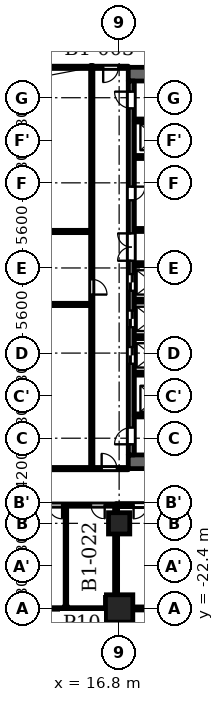
"""IFC4 building model, lengths in metres.
Left out: names, types, materials, properties, quantities, classifications, styles, units other than length and angle.
Written with IfcOpenShell. Run it as: python <this file> out.ifc"""

import sys

from ifc_helpers import new_model, si_unit, direction, frame, frame_2d, origin, origin_2d, place, context, subcontext, project, spatial, rectangle, extrude, element, fill, save


model = new_model("IFC4")
c1 = context("Model", 3, precision=1e-05, world=origin(), true_north=direction((0.0, 1.0)))
c2 = subcontext(c1, "Body", "Model", "MODEL_VIEW")
j1 = project(units=[si_unit("LENGTHUNIT", "METRE"), si_unit("PLANEANGLEUNIT", "RADIAN")], contexts=[c1])
p1 = place(None, origin())
s1 = spatial("IfcSite", under=j1, at=p1, CompositionType="ELEMENT")
p2 = place(p1, origin())
s2 = spatial("IfcBuilding", under=s1, at=p2, CompositionType="ELEMENT")
p3 = place(p2, frame((0.0, 0.0, -4.5)))
s3 = spatial("IfcBuildingStorey", under=s2, at=p3, CompositionType="ELEMENT", Elevation=-4.5)
p4 = place(p3, frame((16.8, -22.4, 0.0), z_axis=(0.0, 0.0, 1.0), x_axis=(1.0, 0.0, 0.0)))
e1 = element("IfcColumn", 1, at=p4, inside=s3, PredefinedType="COLUMN", context=c2, shape_type="SweptSolid", body=[
    extrude(rectangle(XDim=1.8, YDim=1.8, at=origin_2d()), origin(), (0.0, 0.0, 1.0), 4.5),
])
p5 = place(p3, frame((16.8, -16.8, 0.0), z_axis=(0.0, 0.0, 1.0), x_axis=(1.0, 0.0, 0.0)))
e2 = element("IfcColumn", 2, at=p5, inside=s3, PredefinedType="COLUMN", context=c2, shape_type="SweptSolid", body=[
    extrude(rectangle(XDim=1.4, YDim=1.4, at=origin_2d()), origin(), (0.0, 0.0, 1.0), 4.5),
])
for number, where, z_axis, x_axis in (
    (3, (17.4, 12.75, 0.0), (0.0, 0.0, 1.0), (1.0, 0.0, 0.0)),
    (4, (17.4, -12.75, 0.0), (0.0, 0.0, 1.0), (1.0, 0.0, 0.0)),
):
    element("IfcWall", number, at=place(p3, frame(where, z_axis=z_axis, x_axis=x_axis)), inside=s3, PredefinedType="SHEAR", context=c2, shape_type="SweptSolid", body=[
        extrude(rectangle(XDim=10.4, YDim=0.9, at=frame_2d((5.2, 0.0))), origin(), (0.0, 0.0, 1.0), 4.05),
    ])
p6 = place(p3, frame((17.6, -12.3, 0.0), z_axis=(0.0, 0.0, 1.0), x_axis=(0.0, 1.0, 0.0)))
e5 = element("IfcWall", 5, at=p6, inside=s3, PredefinedType="SHEAR", context=c2, shape_type="SweptSolid", body=[
    extrude(rectangle(XDim=24.6, YDim=0.4, at=frame_2d((12.3, 0.0))), origin(), (0.0, 0.0, 1.0), 4.05),
])
p7 = place(p6, frame((6.0, 0.0, 0.0)))
e6 = element("IfcOpeningElement", 6, at=p7, cuts=e5, PredefinedType="OPENING", context=c2, shape_type="SweptSolid", body=[
    extrude(rectangle(XDim=1.1, YDim=2.1, at=frame_2d((0.55, 1.05))), frame((0.0, 0.21, 0.0), z_axis=(0.0, -1.0, 0.0), x_axis=(1.0, 0.0, 0.0)), (0.0, 0.0, 1.0), 0.42),
])
p8 = place(p6, frame((8.4, 0.0, 0.0)))
e7 = element("IfcOpeningElement", 7, at=p8, cuts=e5, PredefinedType="OPENING", context=c2, shape_type="SweptSolid", body=[
    extrude(rectangle(XDim=1.1, YDim=2.1, at=frame_2d((0.55, 1.05))), frame((0.0, 0.21, 0.0), z_axis=(0.0, -1.0, 0.0), x_axis=(1.0, 0.0, 0.0)), (0.0, 0.0, 1.0), 0.42),
])
p9 = place(p6, frame((10.8, 0.0, 0.0)))
e8 = element("IfcOpeningElement", 8, at=p9, cuts=e5, PredefinedType="OPENING", context=c2, shape_type="SweptSolid", body=[
    extrude(rectangle(XDim=1.1, YDim=2.1, at=frame_2d((0.55, 1.05))), frame((0.0, 0.21, 0.0), z_axis=(0.0, -1.0, 0.0), x_axis=(1.0, 0.0, 0.0)), (0.0, 0.0, 1.0), 0.42),
])
p10 = place(p6, frame((16.75, 0.0, 0.0)))
e9 = element("IfcOpeningElement", 9, at=p10, cuts=e5, PredefinedType="OPENING", context=c2, shape_type="SweptSolid", body=[
    extrude(rectangle(XDim=0.9, YDim=2.1, at=frame_2d((0.45, 1.05))), frame((0.0, 0.21, 0.0), z_axis=(0.0, -1.0, 0.0), x_axis=(1.0, 0.0, 0.0)), (0.0, 0.0, 1.0), 0.42),
])
p11 = place(p6, frame((22.8, 0.0, 0.0)))
e10 = element("IfcOpeningElement", 10, at=p11, cuts=e5, PredefinedType="OPENING", context=c2, shape_type="SweptSolid", body=[
    extrude(rectangle(XDim=1.1, YDim=2.1, at=frame_2d((0.55, 1.05))), frame((0.0, 0.21, 0.0), z_axis=(0.0, -1.0, 0.0), x_axis=(1.0, 0.0, 0.0)), (0.0, 0.0, 1.0), 0.42),
])
p12 = place(p6, frame((0.7, 0.0, 0.0)))
e11 = element("IfcOpeningElement", 11, at=p12, cuts=e5, PredefinedType="OPENING", context=c2, shape_type="SweptSolid", body=[
    extrude(rectangle(XDim=1.1, YDim=2.1, at=frame_2d((0.55, 1.05))), frame((0.0, 0.21, 0.0), z_axis=(0.0, -1.0, 0.0), x_axis=(1.0, 0.0, 0.0)), (0.0, 0.0, 1.0), 0.42),
])
p13 = place(p6, frame((12.775, 0.0, 0.0)))
e12 = element("IfcOpeningElement", 12, at=p13, cuts=e5, PredefinedType="OPENING", context=c2, shape_type="SweptSolid", body=[
    extrude(rectangle(XDim=1.8, YDim=2.1, at=frame_2d((0.9, 1.05))), frame((0.0, 0.21, 0.0), z_axis=(0.0, -1.0, 0.0), x_axis=(1.0, 0.0, 0.0)), (0.0, 0.0, 1.0), 0.42),
])
p14 = place(p3, frame((17.8, -9.7, 0.0), z_axis=(0.0, 0.0, 1.0), x_axis=(1.0, 0.0, 0.0)))
e13 = element("IfcWall", 13, at=p14, inside=s3, PredefinedType="SHEAR", context=c2, shape_type="SweptSolid", body=[
    extrude(rectangle(XDim=8.3, YDim=0.2, at=frame_2d((4.15, 0.0))), origin(), (0.0, 0.0, 1.0), 4.05),
])
p15 = place(p14, frame((0.85, 0.0, 0.0)))
e14 = element("IfcOpeningElement", 14, at=p15, cuts=e13, PredefinedType="OPENING", context=c2, shape_type="SweptSolid", body=[
    extrude(rectangle(XDim=1.1, YDim=2.1, at=frame_2d((0.55, 1.05))), frame((0.0, 0.11, 0.0), z_axis=(0.0, -1.0, 0.0), x_axis=(1.0, 0.0, 0.0)), (0.0, 0.0, 1.0), 0.22),
])
p16 = place(p14, frame((3.75, 0.0, 0.0)))
e15 = element("IfcOpeningElement", 15, at=p16, cuts=e13, PredefinedType="OPENING", context=c2, shape_type="SweptSolid", body=[
    extrude(rectangle(XDim=1.1, YDim=2.1, at=frame_2d((0.55, 1.05))), frame((0.0, 0.11, 0.0), z_axis=(0.0, -1.0, 0.0), x_axis=(1.0, 0.0, 0.0)), (0.0, 0.0, 1.0), 0.22),
])
for number, where, z_axis, x_axis in (
    (16, (17.8, -6.95, 0.0), (0.0, 0.0, 1.0), (1.0, 0.0, 0.0)),
    (17, (17.8, -4.55, 0.0), (0.0, 0.0, 1.0), (1.0, 0.0, 0.0)),
    (18, (17.8, -2.15, 0.0), (0.0, 0.0, 1.0), (1.0, 0.0, 0.0)),
):
    element("IfcWall", number, at=place(p3, frame(where, z_axis=z_axis, x_axis=x_axis)), inside=s3, PredefinedType="PARTITIONING", context=c2, shape_type="SweptSolid", body=[
        extrude(rectangle(XDim=2.8, YDim=0.2, at=frame_2d((1.4, 0.0))), origin(), (0.0, 0.0, 1.0), 4.05),
    ])
for number, where, z_axis, x_axis in (
    (19, (17.8, 0.25, 0.0), (0.0, 0.0, 1.0), (1.0, 0.0, 0.0)),
    (20, (17.8, 2.5, 0.0), (0.0, 0.0, 1.0), (1.0, 0.0, 0.0)),
):
    element("IfcWall", number, at=place(p3, frame(where, z_axis=z_axis, x_axis=x_axis)), inside=s3, PredefinedType="PARTITIONING", context=c2, shape_type="SweptSolid", body=[
        extrude(rectangle(XDim=3.0, YDim=0.2, at=frame_2d((1.5, 0.0))), origin(), (0.0, 0.0, 1.0), 4.05),
    ])
p17 = place(p3, frame((17.8, 7.3, 0.0), z_axis=(0.0, 0.0, 1.0), x_axis=(1.0, 0.0, 0.0)))
e21 = element("IfcWall", 21, at=p17, inside=s3, PredefinedType="PARTITIONING", context=c2, shape_type="SweptSolid", body=[
    extrude(rectangle(XDim=2.8, YDim=0.2, at=frame_2d((1.4, 0.0))), origin(), (0.0, 0.0, 1.0), 4.05),
])
p18 = place(p3, frame((17.8, 9.7, 0.0), z_axis=(0.0, 0.0, 1.0), x_axis=(1.0, 0.0, 0.0)))
e22 = element("IfcWall", 22, at=p18, inside=s3, PredefinedType="SHEAR", context=c2, shape_type="SweptSolid", body=[
    extrude(rectangle(XDim=8.3, YDim=0.2, at=frame_2d((4.15, 0.0))), origin(), (0.0, 0.0, 1.0), 4.05),
])
p19 = place(p18, frame((0.85, 0.0, 0.0)))
e23 = element("IfcOpeningElement", 23, at=p19, cuts=e22, PredefinedType="OPENING", context=c2, shape_type="SweptSolid", body=[
    extrude(rectangle(XDim=1.1, YDim=2.1, at=frame_2d((0.55, 1.05))), frame((0.0, 0.11, 0.0), z_axis=(0.0, -1.0, 0.0), x_axis=(1.0, 0.0, 0.0)), (0.0, 0.0, 1.0), 0.22),
])
p20 = place(p18, frame((3.75, 0.0, 0.0)))
e24 = element("IfcOpeningElement", 24, at=p20, cuts=e22, PredefinedType="OPENING", context=c2, shape_type="SweptSolid", body=[
    extrude(rectangle(XDim=1.1, YDim=2.1, at=frame_2d((0.55, 1.05))), frame((0.0, 0.11, 0.0), z_axis=(0.0, -1.0, 0.0), x_axis=(1.0, 0.0, 0.0)), (0.0, 0.0, 1.0), 0.22),
])
p21 = place(p3, frame((10.0, -22.4, 0.0), z_axis=(0.0, 0.0, 1.0), x_axis=(1.0, 0.0, 0.0)))
e25 = element("IfcWall", 25, at=p21, inside=s3, PredefinedType="PARTITIONING", context=c2, shape_type="SweptSolid", body=[
    extrude(rectangle(XDim=6.6, YDim=0.1, at=frame_2d((3.3, 0.0))), origin(), (0.0, 0.0, 1.0), 3.15),
])
p22 = place(p3, frame((16.6, -22.4, 0.0), z_axis=(0.0, 0.0, 1.0), x_axis=(1.0, 0.0, 0.0)))
e26 = element("IfcWall", 26, at=p22, inside=s3, PredefinedType="PARTITIONING", context=c2, shape_type="SweptSolid", body=[
    extrude(rectangle(XDim=2.19, YDim=0.2, at=frame_2d((1.095, 0.0))), origin(), (0.0, 0.0, 1.0), 3.15),
])
p23 = place(p3, frame((-27.67, -15.6, 0.0), z_axis=(0.0, 0.0, 1.0), x_axis=(1.0, 0.0, 0.0)))
e27 = element("IfcWall", 27, at=p23, inside=s3, PredefinedType="PARTITIONING", context=c2, shape_type="SweptSolid", body=[
    extrude(rectangle(XDim=44.27, YDim=0.15, at=frame_2d((22.135, 0.0))), origin(), (0.0, 0.0, 1.0), 4.05),
])
p24 = place(p23, frame((29.42, 0.0, 0.0)))
e28 = element("IfcOpeningElement", 28, at=p24, cuts=e27, PredefinedType="OPENING", context=c2, shape_type="SweptSolid", body=[
    extrude(rectangle(XDim=1.2, YDim=2.1, at=frame_2d((0.6, 1.05))), frame((0.0, 0.085, 0.0), z_axis=(0.0, -1.0, 0.0), x_axis=(1.0, 0.0, 0.0)), (0.0, 0.0, 1.0), 0.17),
])
p25 = place(p23, frame((1.141, 0.0, 0.0)))
e29 = element("IfcOpeningElement", 29, at=p25, cuts=e27, PredefinedType="OPENING", context=c2, shape_type="SweptSolid", body=[
    extrude(rectangle(XDim=0.9, YDim=2.1, at=frame_2d((0.45, 1.05))), frame((0.0, 0.085, 0.0), z_axis=(0.0, -1.0, 0.0), x_axis=(1.0, 0.0, 0.0)), (0.0, 0.0, 1.0), 0.17),
])
p26 = place(p23, frame((18.07, 0.0, 0.0)))
e30 = element("IfcOpeningElement", 30, at=p26, cuts=e27, PredefinedType="OPENING", context=c2, shape_type="SweptSolid", body=[
    extrude(rectangle(XDim=0.9, YDim=2.1, at=frame_2d((0.45, 1.05))), frame((0.0, 0.085, 0.0), z_axis=(0.0, -1.0, 0.0), x_axis=(1.0, 0.0, 0.0)), (0.0, 0.0, 1.0), 0.17),
])
p27 = place(p23, frame((20.32, 0.0, 0.0)))
e31 = element("IfcOpeningElement", 31, at=p27, cuts=e27, PredefinedType="OPENING", context=c2, shape_type="SweptSolid", body=[
    extrude(rectangle(XDim=0.9, YDim=2.1, at=frame_2d((0.45, 1.05))), frame((0.0, 0.085, 0.0), z_axis=(0.0, -1.0, 0.0), x_axis=(1.0, 0.0, 0.0)), (0.0, 0.0, 1.0), 0.17),
])
p28 = place(p23, frame((36.17, 0.0, 0.0)))
e32 = element("IfcOpeningElement", 32, at=p28, cuts=e27, PredefinedType="OPENING", context=c2, shape_type="SweptSolid", body=[
    extrude(rectangle(XDim=0.9, YDim=2.1, at=frame_2d((0.45, 1.05))), frame((0.0, 0.085, 0.0), z_axis=(0.0, -1.0, 0.0), x_axis=(1.0, 0.0, 0.0)), (0.0, 0.0, 1.0), 0.17),
])
p29 = place(p23, frame((39.82, 0.0, 0.0)))
e33 = element("IfcOpeningElement", 33, at=p29, cuts=e27, PredefinedType="OPENING", context=c2, shape_type="SweptSolid", body=[
    extrude(rectangle(XDim=0.9, YDim=2.1, at=frame_2d((0.45, 1.05))), frame((0.0, 0.085, 0.0), z_axis=(0.0, -1.0, 0.0), x_axis=(1.0, 0.0, 0.0)), (0.0, 0.0, 1.0), 0.17),
])
p30 = place(p23, frame((42.62, 0.0, 0.0)))
e34 = element("IfcOpeningElement", 34, at=p30, cuts=e27, PredefinedType="OPENING", context=c2, shape_type="SweptSolid", body=[
    extrude(rectangle(XDim=0.9, YDim=2.1, at=frame_2d((0.45, 1.05))), frame((0.0, 0.085, 0.0), z_axis=(0.0, -1.0, 0.0), x_axis=(1.0, 0.0, 0.0)), (0.0, 0.0, 1.0), 0.17),
])
p31 = place(p3, frame((16.6, -15.6, 0.0), z_axis=(0.0, 0.0, 1.0), x_axis=(1.0, 0.0, 0.0)))
e35 = element("IfcWall", 35, at=p31, inside=s3, PredefinedType="PARTITIONING", context=c2, shape_type="SweptSolid", body=[
    extrude(rectangle(XDim=11.07, YDim=0.2, at=frame_2d((5.535, 0.0))), origin(), (0.0, 0.0, 1.0), 4.05),
])
p32 = place(p31, frame((1.15, 0.0, 0.0)))
e36 = element("IfcOpeningElement", 36, at=p32, cuts=e35, PredefinedType="OPENING", context=c2, shape_type="SweptSolid", body=[
    extrude(rectangle(XDim=0.9, YDim=2.1, at=frame_2d((0.45, 1.05))), frame((0.0, 0.11, 0.0), z_axis=(0.0, -1.0, 0.0), x_axis=(1.0, 0.0, 0.0)), (0.0, 0.0, 1.0), 0.22),
])
p33 = place(p31, frame((8.795, 0.0, 0.0)))
e37 = element("IfcOpeningElement", 37, at=p33, cuts=e35, PredefinedType="OPENING", context=c2, shape_type="SweptSolid", body=[
    extrude(rectangle(XDim=0.9, YDim=2.1, at=frame_2d((0.45, 1.05))), frame((0.0, 0.11, 0.0), z_axis=(0.0, -1.0, 0.0), x_axis=(1.0, 0.0, 0.0)), (0.0, 0.0, 1.0), 0.22),
])
p34 = place(p3, frame((-17.4, -13.2, 0.0), z_axis=(0.0, 0.0, 1.0), x_axis=(1.0, 0.0, 0.0)))
e38 = element("IfcWall", 38, at=p34, inside=s3, PredefinedType="PARTITIONING", context=c2, shape_type="SweptSolid", body=[
    extrude(rectangle(XDim=34.8, YDim=0.15, at=frame_2d((17.4, 0.0))), origin(), (0.0, 0.0, 1.0), 4.05),
])
p35 = place(p34, frame((16.05, 0.0, 0.0)))
e39 = element("IfcOpeningElement", 39, at=p35, cuts=e38, PredefinedType="OPENING", context=c2, shape_type="SweptSolid", body=[
    extrude(rectangle(XDim=1.2, YDim=2.1, at=frame_2d((0.6, 1.05))), frame((0.0, 0.085, 0.0), z_axis=(0.0, -1.0, 0.0), x_axis=(1.0, 0.0, 0.0)), (0.0, 0.0, 1.0), 0.17),
])
p36 = place(p34, frame((0.65, 0.0, 0.0)))
e40 = element("IfcOpeningElement", 40, at=p36, cuts=e38, PredefinedType="OPENING", context=c2, shape_type="SweptSolid", body=[
    extrude(rectangle(XDim=1.0, YDim=2.1, at=frame_2d((0.5, 1.05))), frame((0.0, 0.085, 0.0), z_axis=(0.0, -1.0, 0.0), x_axis=(1.0, 0.0, 0.0)), (0.0, 0.0, 1.0), 0.17),
])
p37 = place(p34, frame((33.05, 0.0, 0.0)))
e41 = element("IfcOpeningElement", 41, at=p37, cuts=e38, PredefinedType="OPENING", context=c2, shape_type="SweptSolid", body=[
    extrude(rectangle(XDim=1.0, YDim=2.1, at=frame_2d((0.5, 1.05))), frame((0.0, 0.085, 0.0), z_axis=(0.0, -1.0, 0.0), x_axis=(1.0, 0.0, 0.0)), (0.0, 0.0, 1.0), 0.17),
])
p38 = place(p3, frame((-14.925, -2.4, 0.0), z_axis=(0.0, 0.0, 1.0), x_axis=(1.0, 0.0, 0.0)))
e42 = element("IfcWall", 42, at=p38, inside=s3, PredefinedType="PARTITIONING", context=c2, shape_type="SweptSolid", body=[
    extrude(rectangle(XDim=29.85, YDim=0.15, at=frame_2d((14.925, 0.0))), origin(), (0.0, 0.0, 1.0), 4.05),
])
p39 = place(p38, frame((13.575, 0.0, 0.0)))
e43 = element("IfcOpeningElement", 43, at=p39, cuts=e42, PredefinedType="OPENING", context=c2, shape_type="SweptSolid", body=[
    extrude(rectangle(XDim=1.2, YDim=2.1, at=frame_2d((0.6, 1.05))), frame((0.0, 0.085, 0.0), z_axis=(0.0, -1.0, 0.0), x_axis=(1.0, 0.0, 0.0)), (0.0, 0.0, 1.0), 0.17),
])
p40 = place(p3, frame((-14.925, 2.4, 0.0), z_axis=(0.0, 0.0, 1.0), x_axis=(1.0, 0.0, 0.0)))
e44 = element("IfcWall", 44, at=p40, inside=s3, PredefinedType="PARTITIONING", context=c2, shape_type="SweptSolid", body=[
    extrude(rectangle(XDim=29.85, YDim=0.15, at=frame_2d((14.925, 0.0))), origin(), (0.0, 0.0, 1.0), 4.05),
])
p41 = place(p40, frame((15.075, 0.0, 0.0)))
e45 = element("IfcOpeningElement", 45, at=p41, cuts=e44, PredefinedType="OPENING", context=c2, shape_type="SweptSolid", body=[
    extrude(rectangle(XDim=1.2, YDim=2.1, at=frame_2d((0.6, 1.05))), frame((0.0, 0.085, 0.0), z_axis=(0.0, -1.0, 0.0), x_axis=(1.0, 0.0, 0.0)), (0.0, 0.0, 1.0), 0.17),
])
p42 = place(p3, frame((-17.4, 13.2, 0.0), z_axis=(0.0, 0.0, 1.0), x_axis=(1.0, 0.0, 0.0)))
e46 = element("IfcWall", 46, at=p42, inside=s3, PredefinedType="PARTITIONING", context=c2, shape_type="SweptSolid", body=[
    extrude(rectangle(XDim=34.8, YDim=0.15, at=frame_2d((17.4, 0.0))), origin(), (0.0, 0.0, 1.0), 4.05),
])
p43 = place(p42, frame((17.55, 0.0, 0.0)))
e47 = element("IfcOpeningElement", 47, at=p43, cuts=e46, PredefinedType="OPENING", context=c2, shape_type="SweptSolid", body=[
    extrude(rectangle(XDim=1.2, YDim=2.1, at=frame_2d((0.6, 1.05))), frame((0.0, 0.085, 0.0), z_axis=(0.0, -1.0, 0.0), x_axis=(1.0, 0.0, 0.0)), (0.0, 0.0, 1.0), 0.17),
])
p44 = place(p42, frame((0.75, 0.0, 0.0)))
e48 = element("IfcOpeningElement", 48, at=p44, cuts=e46, PredefinedType="OPENING", context=c2, shape_type="SweptSolid", body=[
    extrude(rectangle(XDim=1.0, YDim=2.1, at=frame_2d((0.5, 1.05))), frame((0.0, 0.085, 0.0), z_axis=(0.0, -1.0, 0.0), x_axis=(1.0, 0.0, 0.0)), (0.0, 0.0, 1.0), 0.17),
])
p45 = place(p42, frame((33.15, 0.0, 0.0)))
e49 = element("IfcOpeningElement", 49, at=p45, cuts=e46, PredefinedType="OPENING", context=c2, shape_type="SweptSolid", body=[
    extrude(rectangle(XDim=1.0, YDim=2.1, at=frame_2d((0.5, 1.05))), frame((0.0, 0.085, 0.0), z_axis=(0.0, -1.0, 0.0), x_axis=(1.0, 0.0, 0.0)), (0.0, 0.0, 1.0), 0.17),
])
p46 = place(p3, frame((13.3, -22.35, 0.0), z_axis=(0.0, 0.0, 1.0), x_axis=(0.0, 1.0, 0.0)))
e50 = element("IfcWall", 50, at=p46, inside=s3, PredefinedType="PARTITIONING", context=c2, shape_type="SweptSolid", body=[
    extrude(rectangle(XDim=6.675, YDim=0.1, at=frame_2d((3.337, 0.0))), origin(), (0.0, 0.0, 1.0), 4.05),
])
p47 = place(p3, frame((15.0, -13.125, 0.0), z_axis=(0.0, 0.0, 1.0), x_axis=(0.0, 1.0, 0.0)))
e51 = element("IfcWall", 51, at=p47, inside=s3, PredefinedType="PARTITIONING", context=c2, shape_type="SweptSolid", body=[
    extrude(rectangle(XDim=26.25, YDim=0.15, at=frame_2d((13.125, 0.0))), origin(), (0.0, 0.0, 1.0), 4.05),
])
p48 = place(p47, frame((11.375, 0.0, 0.0)))
e52 = element("IfcOpeningElement", 52, at=p48, cuts=e51, PredefinedType="OPENING", context=c2, shape_type="SweptSolid", body=[
    extrude(rectangle(XDim=1.0, YDim=2.1, at=frame_2d((0.5, 1.05))), frame((0.0, 0.085, 0.0), z_axis=(0.0, -1.0, 0.0), x_axis=(1.0, 0.0, 0.0)), (0.0, 0.0, 1.0), 0.17),
])
p49 = place(p3, frame((16.6, -22.35, 0.0), z_axis=(0.0, 0.0, 1.0), x_axis=(0.0, 1.0, 0.0)))
e53 = element("IfcWall", 53, at=p49, inside=s3, PredefinedType="PARTITIONING", context=c2, shape_type="SweptSolid", body=[
    extrude(rectangle(XDim=6.675, YDim=0.2, at=frame_2d((3.337, 0.0))), origin(), (0.0, 0.0, 1.0), 4.05),
])
p50 = place(p7, origin())
e54 = element("IfcDoor", 54, at=p50, inside=s3, OperationType="DOUBLE_DOOR_SLIDING", PredefinedType="DOOR", context=c2, shape_type="SweptSolid", body=[
    extrude(rectangle(XDim=1.1, YDim=2.1, at=frame_2d((0.55, 1.05))), frame((0.0, 0.025, 0.0), z_axis=(0.0, -1.0, 0.0), x_axis=(1.0, 0.0, 0.0)), (0.0, 0.0, 1.0), 0.05),
])
fill(e6, e54)
p51 = place(p8, origin())
e55 = element("IfcDoor", 55, at=p51, inside=s3, OperationType="DOUBLE_DOOR_SLIDING", PredefinedType="DOOR", context=c2, shape_type="SweptSolid", body=[
    extrude(rectangle(XDim=1.1, YDim=2.1, at=frame_2d((0.55, 1.05))), frame((0.0, 0.025, 0.0), z_axis=(0.0, -1.0, 0.0), x_axis=(1.0, 0.0, 0.0)), (0.0, 0.0, 1.0), 0.05),
])
fill(e7, e55)
p52 = place(p9, origin())
e56 = element("IfcDoor", 56, at=p52, inside=s3, OperationType="DOUBLE_DOOR_SLIDING", PredefinedType="DOOR", context=c2, shape_type="SweptSolid", body=[
    extrude(rectangle(XDim=1.1, YDim=2.1, at=frame_2d((0.55, 1.05))), frame((0.0, 0.025, 0.0), z_axis=(0.0, -1.0, 0.0), x_axis=(1.0, 0.0, 0.0)), (0.0, 0.0, 1.0), 0.05),
])
fill(e8, e56)
p53 = place(p10, origin())
e57 = element("IfcDoor", 57, at=p53, inside=s3, OperationType="SINGLE_SWING_RIGHT", PredefinedType="DOOR", context=c2, shape_type="SweptSolid", body=[
    extrude(rectangle(XDim=0.9, YDim=2.1, at=frame_2d((0.45, 1.05))), frame((0.0, 0.025, 0.0), z_axis=(0.0, -1.0, 0.0), x_axis=(1.0, 0.0, 0.0)), (0.0, 0.0, 1.0), 0.05),
])
fill(e9, e57)
p54 = place(p11, origin())
e58 = element("IfcDoor", 58, at=p54, inside=s3, OperationType="SINGLE_SWING_LEFT", PredefinedType="DOOR", context=c2, shape_type="SweptSolid", body=[
    extrude(rectangle(XDim=1.1, YDim=2.1, at=frame_2d((0.55, 1.05))), frame((0.0, 0.025, 0.0), z_axis=(0.0, -1.0, 0.0), x_axis=(1.0, 0.0, 0.0)), (0.0, 0.0, 1.0), 0.05),
])
fill(e10, e58)
p55 = place(p12, origin())
e59 = element("IfcDoor", 59, at=p55, inside=s3, OperationType="SINGLE_SWING_RIGHT", PredefinedType="DOOR", context=c2, shape_type="SweptSolid", body=[
    extrude(rectangle(XDim=1.1, YDim=2.1, at=frame_2d((0.55, 1.05))), frame((0.0, 0.025, 0.0), z_axis=(0.0, -1.0, 0.0), x_axis=(1.0, 0.0, 0.0)), (0.0, 0.0, 1.0), 0.05),
])
fill(e11, e59)
p56 = place(p13, origin())
e60 = element("IfcDoor", 60, at=p56, inside=s3, OperationType="DOUBLE_DOOR_SINGLE_SWING", PredefinedType="DOOR", context=c2, shape_type="SweptSolid", body=[
    extrude(rectangle(XDim=1.8, YDim=2.1, at=frame_2d((0.9, 1.05))), frame((0.0, 0.025, 0.0), z_axis=(0.0, -1.0, 0.0), x_axis=(1.0, 0.0, 0.0)), (0.0, 0.0, 1.0), 0.05),
])
fill(e12, e60)
p57 = place(p48, origin())
e61 = element("IfcDoor", 61, at=p57, inside=s3, OperationType="SINGLE_SWING_LEFT", PredefinedType="DOOR", context=c2, shape_type="SweptSolid", body=[
    extrude(rectangle(XDim=1.0, YDim=2.1, at=frame_2d((0.5, 1.05))), frame((0.0, 0.025, 0.0), z_axis=(0.0, -1.0, 0.0), x_axis=(1.0, 0.0, 0.0)), (0.0, 0.0, 1.0), 0.05),
])
fill(e52, e61)
p58 = place(p45, origin())
e62 = element("IfcDoor", 62, at=p58, inside=s3, OperationType="SINGLE_SWING_LEFT", PredefinedType="DOOR", context=c2, shape_type="SweptSolid", body=[
    extrude(rectangle(XDim=1.0, YDim=2.1, at=frame_2d((0.5, 1.05))), frame((0.0, 0.025, 0.0), z_axis=(0.0, -1.0, 0.0), x_axis=(1.0, 0.0, 0.0)), (0.0, 0.0, 1.0), 0.05),
])
fill(e49, e62)
p59 = place(p37, origin())
e63 = element("IfcDoor", 63, at=p59, inside=s3, OperationType="SINGLE_SWING_RIGHT", PredefinedType="DOOR", context=c2, shape_type="SweptSolid", body=[
    extrude(rectangle(XDim=1.0, YDim=2.1, at=frame_2d((0.5, 1.05))), frame((0.0, 0.025, 0.0), z_axis=(0.0, -1.0, 0.0), x_axis=(1.0, 0.0, 0.0)), (0.0, 0.0, 1.0), 0.05),
])
fill(e41, e63)
p60 = place(p29, origin())
e64 = element("IfcDoor", 64, at=p60, inside=s3, OperationType="SINGLE_SWING_RIGHT", PredefinedType="DOOR", context=c2, shape_type="SweptSolid", body=[
    extrude(rectangle(XDim=0.9, YDim=2.1, at=frame_2d((0.45, 1.05))), frame((0.0, 0.025, 0.0), z_axis=(0.0, -1.0, 0.0), x_axis=(1.0, 0.0, 0.0)), (0.0, 0.0, 1.0), 0.05),
])
fill(e33, e64)
p61 = place(p30, origin())
e65 = element("IfcDoor", 65, at=p61, inside=s3, OperationType="SINGLE_SWING_RIGHT", PredefinedType="DOOR", context=c2, shape_type="SweptSolid", body=[
    extrude(rectangle(XDim=0.9, YDim=2.1, at=frame_2d((0.45, 1.05))), frame((0.0, 0.025, 0.0), z_axis=(0.0, -1.0, 0.0), x_axis=(1.0, 0.0, 0.0)), (0.0, 0.0, 1.0), 0.05),
])
fill(e34, e65)
p62 = place(p32, origin())
e66 = element("IfcDoor", 66, at=p62, inside=s3, OperationType="SINGLE_SWING_LEFT", PredefinedType="DOOR", context=c2, shape_type="SweptSolid", body=[
    extrude(rectangle(XDim=0.9, YDim=2.1, at=frame_2d((0.45, 1.05))), frame((0.0, 0.025, 0.0), z_axis=(0.0, -1.0, 0.0), x_axis=(1.0, 0.0, 0.0)), (0.0, 0.0, 1.0), 0.05),
])
fill(e36, e66)
save(model, sys.argv[1])
